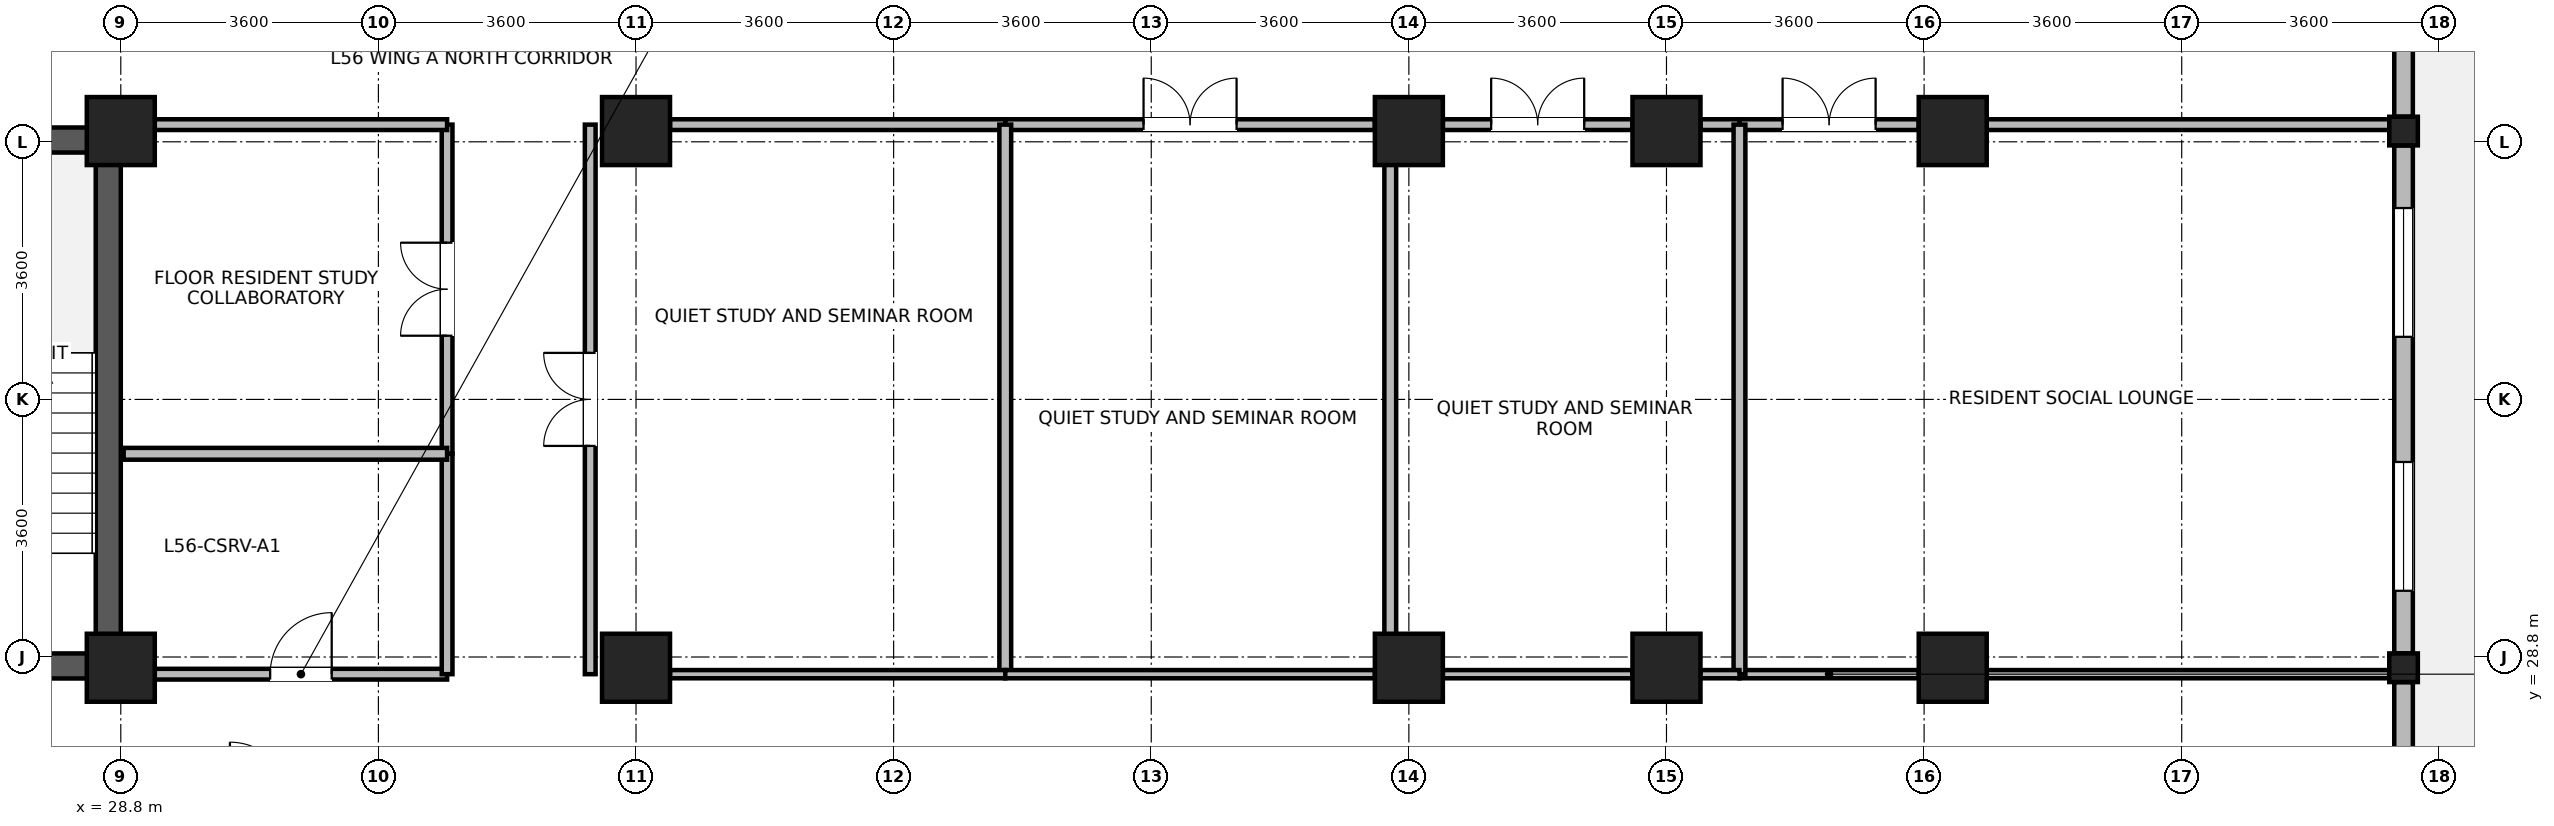
"""IFC4 building model, lengths in metres.
Left out: names, types, materials, properties, quantities, classifications, styles, units other than length and angle.
Written with IfcOpenShell. Run it as: python <this file> out.ifc"""

import sys

from ifc_helpers import new_model, si_unit, direction, frame, frame_2d, origin, origin_2d, place, context, subcontext, project, spatial, rectangle, i_section, extrude, source, transform, mapped, element, fill, save


model = new_model("IFC4")
c1 = context("Model", 3, precision=1e-05, world=origin(), true_north=direction((0.0, 1.0)))
c2 = subcontext(c1, "Body", "Model", "MODEL_VIEW")
j1 = project(units=[si_unit("LENGTHUNIT", "METRE"), si_unit("PLANEANGLEUNIT", "RADIAN")], contexts=[c1])
p1 = place(None, origin())
s1 = spatial("IfcSite", under=j1, at=p1, CompositionType="ELEMENT")
p2 = place(p1, origin())
s2 = spatial("IfcBuilding", under=s1, at=p2, CompositionType="ELEMENT")
p3 = place(p2, frame((0.0, 0.0, 220.3)))
s3 = spatial("IfcBuildingStorey", under=s2, at=p3, CompositionType="ELEMENT", Elevation=220.3)
p4 = place(p3, frame((28.625, 28.5, 0.0), z_axis=(0.0, 0.0, 1.0), x_axis=(0.0, 1.0, 0.0)))
e1 = element("IfcWall", 1, at=p4, inside=s3, PredefinedType="SHEAR", context=c2, shape_type="SweptSolid", body=[
    extrude(rectangle(XDim=7.7, YDim=0.35, at=frame_2d((3.85, 0.0))), origin(), (0.0, 0.0, 1.0), 3.47),
])
for number, where, z_axis, x_axis in (
    (2, (25.25, 28.675, 0.0), (0.0, 0.0, 1.0), (1.0, 0.0, 0.0)),
    (3, (25.25, 36.025, 0.0), (0.0, 0.0, 1.0), (1.0, 0.0, 0.0)),
):
    element("IfcWall", number, at=place(p3, frame(where, z_axis=z_axis, x_axis=x_axis)), inside=s3, PredefinedType="SHEAR", context=c2, shape_type="SweptSolid", body=[
        extrude(rectangle(XDim=3.2, YDim=0.35, at=frame_2d((1.6, 0.0))), origin(), (0.0, 0.0, 1.0), 3.47),
    ])
m1 = source(origin(), c2, "Body", "SweptSolid", [
    extrude(rectangle(XDim=0.95, YDim=0.95, at=origin_2d()), origin(), (0.0, 0.0, 1.0), 3.7),
])
for number, where, z_axis, x_axis in (
    (4, (28.8, 28.65, 0.0), (0.0, 0.0, 1.0), (1.0, 0.0, 0.0)),
    (5, (28.8, 36.15, 0.0), (0.0, 0.0, 1.0), (1.0, 0.0, 0.0)),
    (6, (36.0, 28.65, 0.0), (0.0, 0.0, 1.0), (1.0, 0.0, 0.0)),
    (7, (36.0, 36.15, 0.0), (0.0, 0.0, 1.0), (1.0, 0.0, 0.0)),
    (8, (46.8, 28.65, 0.0), (0.0, 0.0, 1.0), (1.0, 0.0, 0.0)),
    (9, (46.8, 36.15, 0.0), (0.0, 0.0, 1.0), (1.0, 0.0, 0.0)),
    (10, (50.4, 28.65, 0.0), (0.0, 0.0, 1.0), (1.0, 0.0, 0.0)),
    (11, (50.4, 36.15, 0.0), (0.0, 0.0, 1.0), (1.0, 0.0, 0.0)),
    (12, (54.4, 28.65, 0.0), (0.0, 0.0, 1.0), (1.0, 0.0, 0.0)),
    (13, (54.4, 36.15, 0.0), (0.0, 0.0, 1.0), (1.0, 0.0, 0.0)),
):
    element("IfcColumn", number, at=place(p3, frame(where, z_axis=z_axis, x_axis=x_axis)), inside=s3, PredefinedType="COLUMN", context=c2, shape_type="MappedRepresentation", body=[
        mapped(m1, transform((0.0, 0.0, 0.0), x_axis=(1.0, 0.0, 0.0), y_axis=(0.0, 1.0, 0.0), z_axis=(0.0, 0.0, 1.0), scale=1.0)),
    ])
m2 = source(origin(), c2, "Body", "SweptSolid", [
    extrude(i_section(OverallWidth=0.399, OverallDepth=0.4, WebThickness=0.017, FlangeThickness=0.023, FilletRadius=0.015, at=origin_2d()), origin(), (0.0, 0.0, 1.0), 3.7),
])
for number, where, z_axis, x_axis in (
    (14, (60.7, 28.65, 0.0), (0.0, 0.0, 1.0), (1.0, 0.0, 0.0)),
    (15, (60.7, 36.15, 0.0), (0.0, 0.0, 1.0), (1.0, 0.0, 0.0)),
):
    element("IfcColumn", number, at=place(p3, frame(where, z_axis=z_axis, x_axis=x_axis)), inside=s3, PredefinedType="COLUMN", context=c2, shape_type="MappedRepresentation", body=[
        mapped(m2, transform((0.0, 0.0, 0.0), x_axis=(1.0, 0.0, 0.0), y_axis=(0.0, 1.0, 0.0), z_axis=(0.0, 0.0, 1.0), scale=1.0)),
    ])
p5 = place(p3, frame((60.7, 28.449, 0.0), z_axis=(0.0, 0.0, 1.0), x_axis=(0.0, -1.0, 0.0)))
e16 = element("IfcWall", 16, at=p5, inside=s3, PredefinedType="STANDARD", context=c2, shape_type="SweptSolid", body=[
    extrude(rectangle(XDim=6.648, YDim=0.26, at=frame_2d((3.324, 0.0))), origin(), (0.0, 0.0, 1.0), 3.05),
])
p6 = place(p5, frame((4.086, 0.0, 0.85)))
e17 = element("IfcOpeningElement", 17, at=p6, cuts=e16, PredefinedType="OPENING", context=c2, shape_type="SweptSolid", body=[
    extrude(rectangle(XDim=1.8, YDim=1.85, at=frame_2d((0.9, 0.925))), frame((0.0, 0.14, 0.0), z_axis=(0.0, -1.0, 0.0), x_axis=(1.0, 0.0, 0.0)), (0.0, 0.0, 1.0), 0.28),
])
p7 = place(p5, frame((2.317, 0.0, 0.85)))
e18 = element("IfcOpeningElement", 18, at=p7, cuts=e16, PredefinedType="OPENING", context=c2, shape_type="SweptSolid", body=[
    extrude(rectangle(XDim=0.95, YDim=1.75, at=frame_2d((0.475, 0.875))), frame((0.0, 0.14, 0.0), z_axis=(0.0, -1.0, 0.0), x_axis=(1.0, 0.0, 0.0)), (0.0, 0.0, 1.0), 0.28),
])
p8 = place(p3, frame((60.7, 35.949, 0.0), z_axis=(0.0, 0.0, 1.0), x_axis=(0.0, -1.0, 0.0)))
e19 = element("IfcWall", 19, at=p8, inside=s3, PredefinedType="STANDARD", context=c2, shape_type="SweptSolid", body=[
    extrude(rectangle(XDim=7.098, YDim=0.26, at=frame_2d((3.549, 0.0))), origin(), (0.0, 0.0, 1.0), 3.05),
])
p9 = place(p8, frame((0.875, 0.0, 0.85)))
e20 = element("IfcOpeningElement", 20, at=p9, cuts=e19, PredefinedType="OPENING", context=c2, shape_type="SweptSolid", body=[
    extrude(rectangle(XDim=1.8, YDim=1.85, at=frame_2d((0.9, 0.925))), frame((0.0, 0.14, 0.0), z_axis=(0.0, -1.0, 0.0), x_axis=(1.0, 0.0, 0.0)), (0.0, 0.0, 1.0), 0.28),
])
p10 = place(p8, frame((4.424, 0.0, 0.85)))
e21 = element("IfcOpeningElement", 21, at=p10, cuts=e19, PredefinedType="OPENING", context=c2, shape_type="SweptSolid", body=[
    extrude(rectangle(XDim=1.8, YDim=1.85, at=frame_2d((0.9, 0.925))), frame((0.0, 0.14, 0.0), z_axis=(0.0, -1.0, 0.0), x_axis=(1.0, 0.0, 0.0)), (0.0, 0.0, 1.0), 0.28),
])
p11 = place(p3, frame((60.7, 43.33, 0.0), z_axis=(0.0, 0.0, 1.0), x_axis=(0.0, -1.0, 0.0)))
e22 = element("IfcWall", 22, at=p11, inside=s3, PredefinedType="STANDARD", context=c2, shape_type="SweptSolid", body=[
    extrude(rectangle(XDim=6.979, YDim=0.26, at=frame_2d((3.49, 0.0))), origin(), (0.0, 0.0, 1.0), 3.45),
])
p12 = place(p11, frame((0.845, 0.0, 0.85)))
e23 = element("IfcOpeningElement", 23, at=p12, cuts=e22, PredefinedType="OPENING", context=c2, shape_type="SweptSolid", body=[
    extrude(rectangle(XDim=1.8, YDim=1.85, at=frame_2d((0.9, 0.925))), frame((0.0, 0.14, 0.0), z_axis=(0.0, -1.0, 0.0), x_axis=(1.0, 0.0, 0.0)), (0.0, 0.0, 1.0), 0.28),
])
p13 = place(p11, frame((3.014, 0.0, 0.85)))
e24 = element("IfcOpeningElement", 24, at=p13, cuts=e22, PredefinedType="OPENING", context=c2, shape_type="SweptSolid", body=[
    extrude(rectangle(XDim=0.95, YDim=1.75, at=frame_2d((0.475, 0.875))), frame((0.0, 0.14, 0.0), z_axis=(0.0, -1.0, 0.0), x_axis=(1.0, 0.0, 0.0)), (0.0, 0.0, 1.0), 0.28),
])
p14 = place(p3, frame((51.42, 36.24, 0.0), z_axis=(0.0, 0.0, 1.0), x_axis=(1.0, 0.0, 0.0)))
e25 = element("IfcWall", 25, at=p14, inside=s3, PredefinedType="PARTITIONING", context=c2, shape_type="SweptSolid", body=[
    extrude(rectangle(XDim=2.505, YDim=0.15, at=frame_2d((1.252, 0.0))), origin(), (0.0, 0.0, 1.0), 2.9),
])
p15 = place(p14, frame((0.603, 0.0, 0.0)))
e26 = element("IfcOpeningElement", 26, at=p15, cuts=e25, PredefinedType="OPENING", context=c2, shape_type="SweptSolid", body=[
    extrude(rectangle(XDim=1.3, YDim=2.12, at=frame_2d((0.65, 1.06))), frame((0.0, 0.085, 0.0), z_axis=(0.0, -1.0, 0.0), x_axis=(1.0, 0.0, 0.0)), (0.0, 0.0, 1.0), 0.17),
])
p16 = place(p3, frame((54.875, 36.24, 0.0), z_axis=(0.0, 0.0, 1.0), x_axis=(1.0, 0.0, 0.0)))
e27 = element("IfcWall", 27, at=p16, inside=s3, PredefinedType="PARTITIONING", context=c2, shape_type="SweptSolid", body=[
    extrude(rectangle(XDim=5.625, YDim=0.15, at=frame_2d((2.813, 0.0))), origin(), (0.0, 0.0, 1.0), 2.9),
])
p17 = place(p3, frame((35.36, 28.56, 0.0), z_axis=(0.0, 0.0, 1.0), x_axis=(0.0, 1.0, 0.0)))
e28 = element("IfcWall", 28, at=p17, inside=s3, PredefinedType="PARTITIONING", context=c2, shape_type="SweptSolid", body=[
    extrude(rectangle(XDim=7.68, YDim=0.15, at=frame_2d((3.84, 0.0))), origin(), (0.0, 0.0, 1.0), 3.45),
])
p18 = place(p17, frame((3.19, 0.0, 0.0)))
e29 = element("IfcOpeningElement", 29, at=p18, cuts=e28, PredefinedType="OPENING", context=c2, shape_type="SweptSolid", body=[
    extrude(rectangle(XDim=1.3, YDim=2.12, at=frame_2d((0.65, 1.06))), frame((0.0, 0.085, 0.0), z_axis=(0.0, -1.0, 0.0), x_axis=(1.0, 0.0, 0.0)), (0.0, 0.0, 1.0), 0.17),
])
p19 = place(p3, frame((36.475, 36.24, 0.0), z_axis=(0.0, 0.0, 1.0), x_axis=(1.0, 0.0, 0.0)))
e30 = element("IfcWall", 30, at=p19, inside=s3, PredefinedType="PARTITIONING", context=c2, shape_type="SweptSolid", body=[
    extrude(rectangle(XDim=4.685, YDim=0.15, at=frame_2d((2.342, 0.0))), origin(), (0.0, 0.0, 1.0), 2.9),
])
p20 = place(p3, frame((41.16, 36.24, 0.0), z_axis=(0.0, 0.0, 1.0), x_axis=(1.0, 0.0, 0.0)))
e31 = element("IfcWall", 31, at=p20, inside=s3, PredefinedType="PARTITIONING", context=c2, shape_type="SweptSolid", body=[
    extrude(rectangle(XDim=5.165, YDim=0.15, at=frame_2d((2.583, 0.0))), origin(), (0.0, 0.0, 1.0), 2.9),
])
p21 = place(p20, frame((1.933, 0.0, 0.0)))
e32 = element("IfcOpeningElement", 32, at=p21, cuts=e31, PredefinedType="OPENING", context=c2, shape_type="SweptSolid", body=[
    extrude(rectangle(XDim=1.3, YDim=2.12, at=frame_2d((0.65, 1.06))), frame((0.0, 0.085, 0.0), z_axis=(0.0, -1.0, 0.0), x_axis=(1.0, 0.0, 0.0)), (0.0, 0.0, 1.0), 0.17),
])
p22 = place(p3, frame((47.275, 36.24, 0.0), z_axis=(0.0, 0.0, 1.0), x_axis=(1.0, 0.0, 0.0)))
e33 = element("IfcWall", 33, at=p22, inside=s3, PredefinedType="PARTITIONING", context=c2, shape_type="SweptSolid", body=[
    extrude(rectangle(XDim=2.65, YDim=0.15, at=frame_2d((1.325, 0.0))), origin(), (0.0, 0.0, 1.0), 2.9),
])
p23 = place(p22, frame((0.675, 0.0, 0.0)))
e34 = element("IfcOpeningElement", 34, at=p23, cuts=e33, PredefinedType="OPENING", context=c2, shape_type="SweptSolid", body=[
    extrude(rectangle(XDim=1.3, YDim=2.12, at=frame_2d((0.65, 1.06))), frame((0.0, 0.085, 0.0), z_axis=(0.0, -1.0, 0.0), x_axis=(1.0, 0.0, 0.0)), (0.0, 0.0, 1.0), 0.17),
])
p24 = place(p3, frame((50.875, 36.24, 0.0), z_axis=(0.0, 0.0, 1.0), x_axis=(1.0, 0.0, 0.0)))
e35 = element("IfcWall", 35, at=p24, inside=s3, PredefinedType="PARTITIONING", context=c2, shape_type="SweptSolid", body=[
    extrude(rectangle(XDim=0.545, YDim=0.15, at=frame_2d((0.272, 0.0))), origin(), (0.0, 0.0, 1.0), 2.9),
])
p25 = place(p3, frame((33.36, 31.64, 0.0), z_axis=(0.0, 0.0, 1.0), x_axis=(0.0, 1.0, 0.0)))
e36 = element("IfcWall", 36, at=p25, inside=s3, PredefinedType="PARTITIONING", context=c2, shape_type="SweptSolid", body=[
    extrude(rectangle(XDim=4.6, YDim=0.15, at=frame_2d((2.3, 0.0))), origin(), (0.0, 0.0, 1.0), 3.45),
])
p26 = place(p25, frame((1.65, 0.0, 0.0)))
e37 = element("IfcOpeningElement", 37, at=p26, cuts=e36, PredefinedType="OPENING", context=c2, shape_type="SweptSolid", body=[
    extrude(rectangle(XDim=1.3, YDim=2.12, at=frame_2d((0.65, 1.06))), frame((0.0, 0.085, 0.0), z_axis=(0.0, -1.0, 0.0), x_axis=(1.0, 0.0, 0.0)), (0.0, 0.0, 1.0), 0.17),
])
p27 = place(p3, frame((29.275, 28.56, 0.0), z_axis=(0.0, 0.0, 1.0), x_axis=(1.0, 0.0, 0.0)))
e38 = element("IfcWall", 38, at=p27, inside=s3, PredefinedType="PARTITIONING", context=c2, shape_type="SweptSolid", body=[
    extrude(rectangle(XDim=4.085, YDim=0.15, at=frame_2d((2.042, 0.0))), origin(), (0.0, 0.0, 1.0), 2.9),
])
p28 = place(p27, frame((1.613, 0.0, 0.0)))
e39 = element("IfcOpeningElement", 39, at=p28, cuts=e38, PredefinedType="OPENING", context=c2, shape_type="SweptSolid", body=[
    extrude(rectangle(XDim=0.86, YDim=2.02, at=frame_2d((0.43, 1.01))), frame((0.0, 0.085, 0.0), z_axis=(0.0, -1.0, 0.0), x_axis=(1.0, 0.0, 0.0)), (0.0, 0.0, 1.0), 0.17),
])
p29 = place(p3, frame((29.275, 36.24, 0.0), z_axis=(0.0, 0.0, 1.0), x_axis=(1.0, 0.0, 0.0)))
e40 = element("IfcWall", 40, at=p29, inside=s3, PredefinedType="PARTITIONING", context=c2, shape_type="SweptSolid", body=[
    extrude(rectangle(XDim=4.085, YDim=0.15, at=frame_2d((2.042, 0.0))), origin(), (0.0, 0.0, 1.0), 2.9),
])
p30 = place(p3, frame((33.36, 28.56, 0.0), z_axis=(0.0, 0.0, 1.0), x_axis=(0.0, 1.0, 0.0)))
e41 = element("IfcWall", 41, at=p30, inside=s3, PredefinedType="PARTITIONING", context=c2, shape_type="SweptSolid", body=[
    extrude(rectangle(XDim=3.08, YDim=0.15, at=frame_2d((1.54, 0.0))), origin(), (0.0, 0.0, 1.0), 3.45),
])
p31 = place(p3, frame((51.42, 28.56, 0.0), z_axis=(0.0, 0.0, 1.0), x_axis=(1.0, 0.0, 0.0)))
e42 = element("IfcWall", 42, at=p31, inside=s3, PredefinedType="PARTITIONING", context=c2, shape_type="SweptSolid", body=[
    extrude(rectangle(XDim=2.505, YDim=0.115, at=frame_2d((1.252, 0.0))), origin(), (0.0, 0.0, 1.0), 2.9),
])
p32 = place(p3, frame((54.875, 28.56, 0.0), z_axis=(0.0, 0.0, 1.0), x_axis=(1.0, 0.0, 0.0)))
e43 = element("IfcWall", 43, at=p32, inside=s3, PredefinedType="PARTITIONING", context=c2, shape_type="SweptSolid", body=[
    extrude(rectangle(XDim=5.625, YDim=0.115, at=frame_2d((2.813, 0.0))), origin(), (0.0, 0.0, 1.0), 2.9),
])
for number, where, z_axis, x_axis in (
    (44, (41.16, 28.56, 0.0), (0.0, 0.0, 1.0), (0.0, 1.0, 0.0)),
    (45, (46.54, 28.56, 0.0), (0.0, 0.0, 1.0), (0.0, 1.0, 0.0)),
    (46, (51.42, 28.56, 0.0), (0.0, 0.0, 1.0), (0.0, 1.0, 0.0)),
):
    element("IfcWall", number, at=place(p3, frame(where, z_axis=z_axis, x_axis=x_axis)), inside=s3, PredefinedType="PARTITIONING", context=c2, shape_type="SweptSolid", body=[
        extrude(rectangle(XDim=7.68, YDim=0.165, at=frame_2d((3.84, 0.0))), origin(), (0.0, 0.0, 1.0), 3.45),
    ])
p33 = place(p3, frame((36.475, 28.56, 0.0), z_axis=(0.0, 0.0, 1.0), x_axis=(1.0, 0.0, 0.0)))
e47 = element("IfcWall", 47, at=p33, inside=s3, PredefinedType="PARTITIONING", context=c2, shape_type="SweptSolid", body=[
    extrude(rectangle(XDim=4.685, YDim=0.115, at=frame_2d((2.342, 0.0))), origin(), (0.0, 0.0, 1.0), 2.9),
])
p34 = place(p3, frame((41.16, 28.56, 0.0), z_axis=(0.0, 0.0, 1.0), x_axis=(1.0, 0.0, 0.0)))
e48 = element("IfcWall", 48, at=p34, inside=s3, PredefinedType="PARTITIONING", context=c2, shape_type="SweptSolid", body=[
    extrude(rectangle(XDim=5.165, YDim=0.115, at=frame_2d((2.583, 0.0))), origin(), (0.0, 0.0, 1.0), 2.9),
])
p35 = place(p3, frame((47.275, 28.56, 0.0), z_axis=(0.0, 0.0, 1.0), x_axis=(1.0, 0.0, 0.0)))
e49 = element("IfcWall", 49, at=p35, inside=s3, PredefinedType="PARTITIONING", context=c2, shape_type="SweptSolid", body=[
    extrude(rectangle(XDim=2.65, YDim=0.115, at=frame_2d((1.325, 0.0))), origin(), (0.0, 0.0, 1.0), 2.9),
])
p36 = place(p3, frame((50.875, 28.56, 0.0), z_axis=(0.0, 0.0, 1.0), x_axis=(1.0, 0.0, 0.0)))
e50 = element("IfcWall", 50, at=p36, inside=s3, PredefinedType="PARTITIONING", context=c2, shape_type="SweptSolid", body=[
    extrude(rectangle(XDim=0.545, YDim=0.115, at=frame_2d((0.272, 0.0))), origin(), (0.0, 0.0, 1.0), 2.9),
])
p37 = place(p3, frame((28.84, 31.64, 0.0), z_axis=(0.0, 0.0, 1.0), x_axis=(1.0, 0.0, 0.0)))
e51 = element("IfcWall", 51, at=p37, inside=s3, PredefinedType="PARTITIONING", context=c2, shape_type="SweptSolid", body=[
    extrude(rectangle(XDim=4.52, YDim=0.165, at=frame_2d((2.26, 0.0))), origin(), (0.0, 0.0, 1.0), 3.45),
])
p38 = place(p9, origin())
e52 = element("IfcWindow", 52, at=p38, inside=s3, PartitioningType="SINGLE_PANEL", PredefinedType="WINDOW", context=c2, shape_type="SweptSolid", body=[
    extrude(rectangle(XDim=1.8, YDim=1.85, at=frame_2d((0.9, 0.925))), frame((0.0, 0.03, 0.0), z_axis=(0.0, -1.0, 0.0), x_axis=(1.0, 0.0, 0.0)), (0.0, 0.0, 1.0), 0.06),
])
fill(e20, e52)
p39 = place(p10, origin())
e53 = element("IfcWindow", 53, at=p39, inside=s3, PartitioningType="SINGLE_PANEL", PredefinedType="WINDOW", context=c2, shape_type="SweptSolid", body=[
    extrude(rectangle(XDim=1.8, YDim=1.85, at=frame_2d((0.9, 0.925))), frame((0.0, 0.03, 0.0), z_axis=(0.0, -1.0, 0.0), x_axis=(1.0, 0.0, 0.0)), (0.0, 0.0, 1.0), 0.06),
])
fill(e21, e53)
p40 = place(p15, origin())
e54 = element("IfcDoor", 54, at=p40, inside=s3, OperationType="DOUBLE_DOOR_SINGLE_SWING", PredefinedType="DOOR", context=c2, shape_type="SweptSolid", body=[
    extrude(rectangle(XDim=1.3, YDim=2.12, at=frame_2d((0.65, 1.06))), frame((0.0, 0.025, 0.0), z_axis=(0.0, -1.0, 0.0), x_axis=(1.0, 0.0, 0.0)), (0.0, 0.0, 1.0), 0.05),
])
fill(e26, e54)
p41 = place(p18, origin())
e55 = element("IfcDoor", 55, at=p41, inside=s3, OperationType="DOUBLE_DOOR_SINGLE_SWING", PredefinedType="DOOR", context=c2, shape_type="SweptSolid", body=[
    extrude(rectangle(XDim=1.3, YDim=2.12, at=frame_2d((0.65, 1.06))), frame((0.0, 0.025, 0.0), z_axis=(0.0, -1.0, 0.0), x_axis=(1.0, 0.0, 0.0)), (0.0, 0.0, 1.0), 0.05),
])
fill(e29, e55)
p42 = place(p21, origin())
e56 = element("IfcDoor", 56, at=p42, inside=s3, OperationType="DOUBLE_DOOR_SINGLE_SWING", PredefinedType="DOOR", context=c2, shape_type="SweptSolid", body=[
    extrude(rectangle(XDim=1.3, YDim=2.12, at=frame_2d((0.65, 1.06))), frame((0.0, 0.025, 0.0), z_axis=(0.0, -1.0, 0.0), x_axis=(1.0, 0.0, 0.0)), (0.0, 0.0, 1.0), 0.05),
])
fill(e32, e56)
p43 = place(p23, origin())
e57 = element("IfcDoor", 57, at=p43, inside=s3, OperationType="DOUBLE_DOOR_SINGLE_SWING", PredefinedType="DOOR", context=c2, shape_type="SweptSolid", body=[
    extrude(rectangle(XDim=1.3, YDim=2.12, at=frame_2d((0.65, 1.06))), frame((0.0, 0.025, 0.0), z_axis=(0.0, -1.0, 0.0), x_axis=(1.0, 0.0, 0.0)), (0.0, 0.0, 1.0), 0.05),
])
fill(e34, e57)
p44 = place(p26, origin())
e58 = element("IfcDoor", 58, at=p44, inside=s3, OperationType="DOUBLE_DOOR_SINGLE_SWING", PredefinedType="DOOR", context=c2, shape_type="SweptSolid", body=[
    extrude(rectangle(XDim=1.3, YDim=2.12, at=frame_2d((0.65, 1.06))), frame((0.0, 0.025, 0.0), z_axis=(0.0, -1.0, 0.0), x_axis=(1.0, 0.0, 0.0)), (0.0, 0.0, 1.0), 0.05),
])
fill(e37, e58)
p45 = place(p28, origin())
e59 = element("IfcDoor", 59, at=p45, inside=s3, OperationType="SINGLE_SWING_RIGHT", PredefinedType="DOOR", context=c2, shape_type="SweptSolid", body=[
    extrude(rectangle(XDim=0.86, YDim=2.02, at=frame_2d((0.43, 1.01))), frame((0.0, 0.025, 0.0), z_axis=(0.0, -1.0, 0.0), x_axis=(1.0, 0.0, 0.0)), (0.0, 0.0, 1.0), 0.05),
])
fill(e39, e59)
save(model, sys.argv[1])
